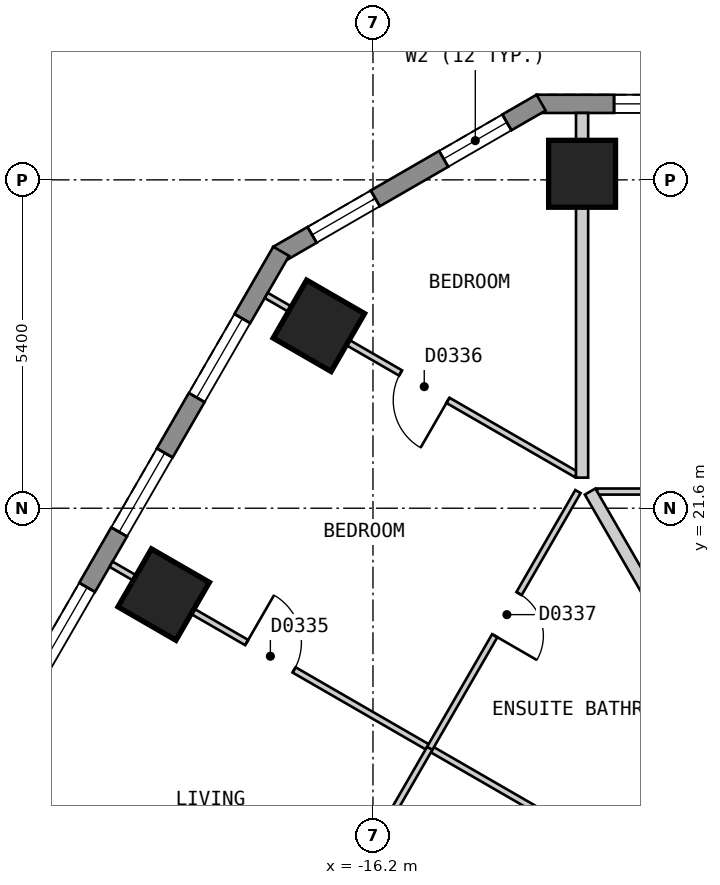
"""IFC4 building model, lengths in metres.
Left out: names, types, materials, properties, quantities, classifications, styles, units other than length and angle.
Written with IfcOpenShell. Run it as: python <this file> out.ifc"""

import sys

from ifc_helpers import new_model, si_unit, direction, frame, frame_2d, origin, origin_2d, place, context, subcontext, project, spatial, polyline, rectangle, outline, extrude, element, fill, save


model = new_model("IFC4")
c1 = context("Model", 3, precision=1e-05, world=origin(), true_north=direction((0.0, 1.0)))
c2 = subcontext(c1, "Body", "Model", "MODEL_VIEW")
j1 = project(units=[si_unit("LENGTHUNIT", "METRE"), si_unit("PLANEANGLEUNIT", "RADIAN")], contexts=[c1])
p1 = place(None, origin())
s1 = spatial("IfcSite", under=j1, at=p1, CompositionType="ELEMENT")
p2 = place(p1, origin())
s2 = spatial("IfcBuilding", under=s1, at=p2, CompositionType="ELEMENT")
p3 = place(p2, frame((0.0, 0.0, 59.4)))
s3 = spatial("IfcBuildingStorey", under=s2, at=p3, CompositionType="ELEMENT", Elevation=59.4)
for number, where, z_axis, x_axis in (
    (1, (-12.761, 27.1, 0.0), (0.0, 0.0, 1.0), (-1.0, 0.0, 0.0)),
    (2, (-17.09, 24.6, 0.0), (0.0, 0.0, 1.0), (-0.5, -0.866, 0.0)),
    (3, (-19.642, 20.18, 0.0), (0.0, 0.0, 1.0), (-0.5, -0.866, 0.0)),
):
    element("IfcColumn", number, at=place(p3, frame(where, z_axis=z_axis, x_axis=x_axis)), inside=s3, PredefinedType="COLUMN", context=c2, shape_type="SweptSolid", body=[
        extrude(rectangle(XDim=1.1, YDim=1.1, at=origin_2d()), origin(), (0.0, 0.0, 1.0), 3.0),
    ])
p4 = place(p3, frame((13.51, 28.25, 0.0), z_axis=(0.0, 0.0, 1.0), x_axis=(-1.0, 0.0, 0.0)))
e4 = element("IfcWall", 4, at=p4, inside=s3, PredefinedType="SOLIDWALL", context=c2, shape_type="SweptSolid", body=[
    extrude(outline(polyline([(0.0, -0.15), (27.02, -0.15), (26.94, 0.15), (0.08, 0.15), (0.0, -0.15)])), origin(), (0.0, 0.0, 1.0), 2.6),
])
p5 = place(p4, frame((1.277, 0.0, 0.15)))
e5 = element("IfcOpeningElement", 5, at=p5, cuts=e4, PredefinedType="OPENING", context=c2, shape_type="SweptSolid", body=[
    extrude(rectangle(XDim=1.5, YDim=2.1, at=frame_2d((0.75, 1.05))), frame((0.0, 0.16, 0.0), z_axis=(0.0, -1.0, 0.0), x_axis=(1.0, 0.0, 0.0)), (0.0, 0.0, 1.0), 0.32),
])
p6 = place(p4, frame((3.829, 0.0, 0.15)))
e6 = element("IfcOpeningElement", 6, at=p6, cuts=e4, PredefinedType="OPENING", context=c2, shape_type="SweptSolid", body=[
    extrude(rectangle(XDim=1.5, YDim=2.1, at=frame_2d((0.75, 1.05))), frame((0.0, 0.16, 0.0), z_axis=(0.0, -1.0, 0.0), x_axis=(1.0, 0.0, 0.0)), (0.0, 0.0, 1.0), 0.32),
])
p7 = place(p4, frame((6.381, 0.0, 0.15)))
e7 = element("IfcOpeningElement", 7, at=p7, cuts=e4, PredefinedType="OPENING", context=c2, shape_type="SweptSolid", body=[
    extrude(rectangle(XDim=1.5, YDim=2.1, at=frame_2d((0.75, 1.05))), frame((0.0, 0.16, 0.0), z_axis=(0.0, -1.0, 0.0), x_axis=(1.0, 0.0, 0.0)), (0.0, 0.0, 1.0), 0.32),
])
p8 = place(p4, frame((8.933, 0.0, 0.15)))
e8 = element("IfcOpeningElement", 8, at=p8, cuts=e4, PredefinedType="OPENING", context=c2, shape_type="SweptSolid", body=[
    extrude(rectangle(XDim=1.5, YDim=2.1, at=frame_2d((0.75, 1.05))), frame((0.0, 0.16, 0.0), z_axis=(0.0, -1.0, 0.0), x_axis=(1.0, 0.0, 0.0)), (0.0, 0.0, 1.0), 0.32),
])
p9 = place(p4, frame((11.485, 0.0, 0.15)))
e9 = element("IfcOpeningElement", 9, at=p9, cuts=e4, PredefinedType="OPENING", context=c2, shape_type="SweptSolid", body=[
    extrude(rectangle(XDim=1.5, YDim=2.1, at=frame_2d((0.75, 1.05))), frame((0.0, 0.16, 0.0), z_axis=(0.0, -1.0, 0.0), x_axis=(1.0, 0.0, 0.0)), (0.0, 0.0, 1.0), 0.32),
])
p10 = place(p4, frame((14.037, 0.0, 0.15)))
e10 = element("IfcOpeningElement", 10, at=p10, cuts=e4, PredefinedType="OPENING", context=c2, shape_type="SweptSolid", body=[
    extrude(rectangle(XDim=1.5, YDim=2.1, at=frame_2d((0.75, 1.05))), frame((0.0, 0.16, 0.0), z_axis=(0.0, -1.0, 0.0), x_axis=(1.0, 0.0, 0.0)), (0.0, 0.0, 1.0), 0.32),
])
p11 = place(p4, frame((16.589, 0.0, 0.15)))
e11 = element("IfcOpeningElement", 11, at=p11, cuts=e4, PredefinedType="OPENING", context=c2, shape_type="SweptSolid", body=[
    extrude(rectangle(XDim=1.5, YDim=2.1, at=frame_2d((0.75, 1.05))), frame((0.0, 0.16, 0.0), z_axis=(0.0, -1.0, 0.0), x_axis=(1.0, 0.0, 0.0)), (0.0, 0.0, 1.0), 0.32),
])
p12 = place(p4, frame((19.141, 0.0, 0.15)))
e12 = element("IfcOpeningElement", 12, at=p12, cuts=e4, PredefinedType="OPENING", context=c2, shape_type="SweptSolid", body=[
    extrude(rectangle(XDim=1.5, YDim=2.1, at=frame_2d((0.75, 1.05))), frame((0.0, 0.16, 0.0), z_axis=(0.0, -1.0, 0.0), x_axis=(1.0, 0.0, 0.0)), (0.0, 0.0, 1.0), 0.32),
])
p13 = place(p4, frame((21.693, 0.0, 0.15)))
e13 = element("IfcOpeningElement", 13, at=p13, cuts=e4, PredefinedType="OPENING", context=c2, shape_type="SweptSolid", body=[
    extrude(rectangle(XDim=1.5, YDim=2.1, at=frame_2d((0.75, 1.05))), frame((0.0, 0.16, 0.0), z_axis=(0.0, -1.0, 0.0), x_axis=(1.0, 0.0, 0.0)), (0.0, 0.0, 1.0), 0.32),
])
p14 = place(p4, frame((24.245, 0.0, 0.15)))
e14 = element("IfcOpeningElement", 14, at=p14, cuts=e4, PredefinedType="OPENING", context=c2, shape_type="SweptSolid", body=[
    extrude(rectangle(XDim=1.5, YDim=2.1, at=frame_2d((0.75, 1.05))), frame((0.0, 0.16, 0.0), z_axis=(0.0, -1.0, 0.0), x_axis=(1.0, 0.0, 0.0)), (0.0, 0.0, 1.0), 0.32),
])
p15 = place(p3, frame((-13.435, 28.27, 0.0), z_axis=(0.0, 0.0, 1.0), x_axis=(-0.866010750942, -0.50002537861, 0.0)))
e15 = element("IfcWall", 15, at=p15, inside=s3, PredefinedType="SOLIDWALL", context=c2, shape_type="SweptSolid", body=[
    extrude(outline(polyline([(0.0, -0.15), (5.0, -0.15), (4.919, 0.15), (0.08, 0.15), (0.0, -0.15)])), origin(), (0.0, 0.0, 1.0), 2.6),
])
p16 = place(p15, frame((0.65, 0.0, 0.15)))
e16 = element("IfcOpeningElement", 16, at=p16, cuts=e15, PredefinedType="OPENING", context=c2, shape_type="SweptSolid", body=[
    extrude(rectangle(XDim=1.2, YDim=2.1, at=frame_2d((0.6, 1.05))), frame((0.0, 0.16, 0.0), z_axis=(0.0, -1.0, 0.0), x_axis=(1.0, 0.0, 0.0)), (0.0, 0.0, 1.0), 0.32),
])
p17 = place(p15, frame((3.149, 0.0, 0.15)))
e17 = element("IfcOpeningElement", 17, at=p17, cuts=e15, PredefinedType="OPENING", context=c2, shape_type="SweptSolid", body=[
    extrude(rectangle(XDim=1.2, YDim=2.1, at=frame_2d((0.6, 1.05))), frame((0.0, 0.16, 0.0), z_axis=(0.0, -1.0, 0.0), x_axis=(1.0, 0.0, 0.0)), (0.0, 0.0, 1.0), 0.32),
])
p18 = place(p3, frame((-17.71, 25.825, 0.0), z_axis=(0.0, 0.0, 1.0), x_axis=(-0.500001938803, -0.866024284413, 0.0)))
e18 = element("IfcWall", 18, at=p18, inside=s3, PredefinedType="SOLIDWALL", context=c2, shape_type="SweptSolid", body=[
    extrude(outline(polyline([(0.0, -0.15), (27.02, -0.15), (26.94, 0.15), (0.08, 0.15), (0.0, -0.15)])), origin(), (0.0, 0.0, 1.0), 2.6),
])
p19 = place(p18, frame((1.277, 0.0, 0.15)))
e19 = element("IfcOpeningElement", 19, at=p19, cuts=e18, PredefinedType="OPENING", context=c2, shape_type="SweptSolid", body=[
    extrude(rectangle(XDim=1.5, YDim=2.1, at=frame_2d((0.75, 1.05))), frame((0.0, 0.16, 0.0), z_axis=(0.0, -1.0, 0.0), x_axis=(1.0, 0.0, 0.0)), (0.0, 0.0, 1.0), 0.32),
])
p20 = place(p18, frame((3.829, 0.0, 0.15)))
e20 = element("IfcOpeningElement", 20, at=p20, cuts=e18, PredefinedType="OPENING", context=c2, shape_type="SweptSolid", body=[
    extrude(rectangle(XDim=1.5, YDim=2.1, at=frame_2d((0.75, 1.05))), frame((0.0, 0.16, 0.0), z_axis=(0.0, -1.0, 0.0), x_axis=(1.0, 0.0, 0.0)), (0.0, 0.0, 1.0), 0.32),
])
p21 = place(p18, frame((6.382, 0.0, 0.15)))
e21 = element("IfcOpeningElement", 21, at=p21, cuts=e18, PredefinedType="OPENING", context=c2, shape_type="SweptSolid", body=[
    extrude(rectangle(XDim=1.5, YDim=2.1, at=frame_2d((0.75, 1.05))), frame((0.0, 0.16, 0.0), z_axis=(0.0, -1.0, 0.0), x_axis=(1.0, 0.0, 0.0)), (0.0, 0.0, 1.0), 0.32),
])
p22 = place(p18, frame((8.933, 0.0, 0.15)))
e22 = element("IfcOpeningElement", 22, at=p22, cuts=e18, PredefinedType="OPENING", context=c2, shape_type="SweptSolid", body=[
    extrude(rectangle(XDim=1.5, YDim=2.1, at=frame_2d((0.75, 1.05))), frame((0.0, 0.16, 0.0), z_axis=(0.0, -1.0, 0.0), x_axis=(1.0, 0.0, 0.0)), (0.0, 0.0, 1.0), 0.32),
])
p23 = place(p18, frame((11.485, 0.0, 0.15)))
e23 = element("IfcOpeningElement", 23, at=p23, cuts=e18, PredefinedType="OPENING", context=c2, shape_type="SweptSolid", body=[
    extrude(rectangle(XDim=1.5, YDim=2.1, at=frame_2d((0.75, 1.05))), frame((0.0, 0.16, 0.0), z_axis=(0.0, -1.0, 0.0), x_axis=(1.0, 0.0, 0.0)), (0.0, 0.0, 1.0), 0.32),
])
p24 = place(p18, frame((14.037, 0.0, 0.15)))
e24 = element("IfcOpeningElement", 24, at=p24, cuts=e18, PredefinedType="OPENING", context=c2, shape_type="SweptSolid", body=[
    extrude(rectangle(XDim=1.5, YDim=2.1, at=frame_2d((0.75, 1.05))), frame((0.0, 0.16, 0.0), z_axis=(0.0, -1.0, 0.0), x_axis=(1.0, 0.0, 0.0)), (0.0, 0.0, 1.0), 0.32),
])
p25 = place(p18, frame((16.589, 0.0, 0.15)))
e25 = element("IfcOpeningElement", 25, at=p25, cuts=e18, PredefinedType="OPENING", context=c2, shape_type="SweptSolid", body=[
    extrude(rectangle(XDim=1.5, YDim=2.1, at=frame_2d((0.75, 1.05))), frame((0.0, 0.16, 0.0), z_axis=(0.0, -1.0, 0.0), x_axis=(1.0, 0.0, 0.0)), (0.0, 0.0, 1.0), 0.32),
])
p26 = place(p18, frame((19.141, 0.0, 0.15)))
e26 = element("IfcOpeningElement", 26, at=p26, cuts=e18, PredefinedType="OPENING", context=c2, shape_type="SweptSolid", body=[
    extrude(rectangle(XDim=1.5, YDim=2.1, at=frame_2d((0.75, 1.05))), frame((0.0, 0.16, 0.0), z_axis=(0.0, -1.0, 0.0), x_axis=(1.0, 0.0, 0.0)), (0.0, 0.0, 1.0), 0.32),
])
p27 = place(p18, frame((21.693, 0.0, 0.15)))
e27 = element("IfcOpeningElement", 27, at=p27, cuts=e18, PredefinedType="OPENING", context=c2, shape_type="SweptSolid", body=[
    extrude(rectangle(XDim=1.5, YDim=2.1, at=frame_2d((0.75, 1.05))), frame((0.0, 0.16, 0.0), z_axis=(0.0, -1.0, 0.0), x_axis=(1.0, 0.0, 0.0)), (0.0, 0.0, 1.0), 0.32),
])
p28 = place(p18, frame((24.244, 0.0, 0.15)))
e28 = element("IfcOpeningElement", 28, at=p28, cuts=e18, PredefinedType="OPENING", context=c2, shape_type="SweptSolid", body=[
    extrude(rectangle(XDim=1.5, YDim=2.1, at=frame_2d((0.75, 1.05))), frame((0.0, 0.16, 0.0), z_axis=(0.0, -1.0, 0.0), x_axis=(1.0, 0.0, 0.0)), (0.0, 0.0, 1.0), 0.32),
])
p29 = place(p3, frame((-20.727, 0.099, 0.0), z_axis=(0.0, 0.0, 1.0), x_axis=(0.499993204491, 0.866029327138, 0.0)))
e29 = element("IfcWall", 29, at=p29, inside=s3, PredefinedType="PARTITIONING", context=c2, shape_type="SweptSolid", body=[
    extrude(rectangle(XDim=20.554, YDim=0.2, at=frame_2d((10.277, 0.0))), origin(), (0.0, 0.0, 1.0), 2.6),
])
p30 = place(p29, frame((14.88, 0.0, 0.0)))
e30 = element("IfcOpeningElement", 30, at=p30, cuts=e29, PredefinedType="OPENING", context=c2, shape_type="SweptSolid", body=[
    extrude(rectangle(XDim=1.0, YDim=2.1, at=frame_2d((0.5, 1.05))), frame((0.0, 0.11, 0.0), z_axis=(0.0, -1.0, 0.0), x_axis=(1.0, 0.0, 0.0)), (0.0, 0.0, 1.0), 0.22),
])
p31 = place(p29, frame((4.673, 0.0, 0.0)))
e31 = element("IfcOpeningElement", 31, at=p31, cuts=e29, PredefinedType="OPENING", context=c2, shape_type="SweptSolid", body=[
    extrude(rectangle(XDim=1.0, YDim=2.1, at=frame_2d((0.5, 1.05))), frame((0.0, 0.11, 0.0), z_axis=(0.0, -1.0, 0.0), x_axis=(1.0, 0.0, 0.0)), (0.0, 0.0, 1.0), 0.22),
])
p32 = place(p29, frame((0.838, 0.0, 0.0)))
e32 = element("IfcOpeningElement", 32, at=p32, cuts=e29, PredefinedType="OPENING", context=c2, shape_type="SweptSolid", body=[
    extrude(rectangle(XDim=0.8, YDim=2.1, at=frame_2d((0.4, 1.05))), frame((0.0, 0.11, 0.0), z_axis=(0.0, -1.0, 0.0), x_axis=(1.0, 0.0, 0.0)), (0.0, 0.0, 1.0), 0.22),
])
p33 = place(p3, frame((-20.508, 20.679, 0.0), z_axis=(0.0, 0.0, 1.0), x_axis=(0.866047370643, -0.499961950354, 0.0)))
e33 = element("IfcWall", 33, at=p33, inside=s3, PredefinedType="PARTITIONING", context=c2, shape_type="SweptSolid", body=[
    extrude(rectangle(XDim=10.001, YDim=0.1, at=frame_2d((5.0, 0.0))), origin(), (0.0, 0.0, 1.0), 2.6),
])
p34 = place(p33, frame((2.576, 0.0, 0.0)))
e34 = element("IfcOpeningElement", 34, at=p34, cuts=e33, PredefinedType="OPENING", context=c2, shape_type="SweptSolid", body=[
    extrude(rectangle(XDim=0.9, YDim=2.1, at=frame_2d((0.45, 1.05))), frame((0.0, 0.06, 0.0), z_axis=(0.0, -1.0, 0.0), x_axis=(1.0, 0.0, 0.0)), (0.0, 0.0, 1.0), 0.12),
])
p35 = place(p3, frame((-17.955, 25.099, 0.0), z_axis=(0.0, 0.0, 1.0), x_axis=(0.866036353684, -0.499981033738, 0.0)))
e35 = element("IfcWall", 35, at=p35, inside=s3, PredefinedType="PARTITIONING", context=c2, shape_type="SweptSolid", body=[
    extrude(rectangle(XDim=5.885, YDim=0.1, at=frame_2d((2.942, 0.0))), origin(), (0.0, 0.0, 1.0), 2.6),
])
p36 = place(p35, frame((2.55, 0.0, 0.0)))
e36 = element("IfcOpeningElement", 36, at=p36, cuts=e35, PredefinedType="OPENING", context=c2, shape_type="SweptSolid", body=[
    extrude(rectangle(XDim=0.9, YDim=2.1, at=frame_2d((0.45, 1.05))), frame((0.0, 0.06, 0.0), z_axis=(0.0, -1.0, 0.0), x_axis=(1.0, 0.0, 0.0)), (0.0, 0.0, 1.0), 0.12),
])
p37 = place(p3, frame((-12.513, 21.874, 0.0), z_axis=(0.0, 0.0, 1.0), x_axis=(1.0, 0.0, 0.0)))
e37 = element("IfcWall", 37, at=p37, inside=s3, PredefinedType="PARTITIONING", context=c2, shape_type="SweptSolid", body=[
    extrude(rectangle(XDim=4.806, YDim=0.1, at=frame_2d((2.403, 0.0))), origin(), (0.0, 0.0, 1.0), 2.6),
])
p38 = place(p37, frame((1.97, 0.0, 0.0)))
e38 = element("IfcOpeningElement", 38, at=p38, cuts=e37, PredefinedType="OPENING", context=c2, shape_type="SweptSolid", body=[
    extrude(rectangle(XDim=0.8, YDim=2.1, at=frame_2d((0.4, 1.05))), frame((0.0, 0.06, 0.0), z_axis=(0.0, -1.0, 0.0), x_axis=(1.0, 0.0, 0.0)), (0.0, 0.0, 1.0), 0.12),
])
p39 = place(p3, frame((-17.768, 13.319, 0.0), z_axis=(0.0, 0.0, 1.0), x_axis=(0.499958946799, 0.866049104564, 0.0)))
e39 = element("IfcWall", 39, at=p39, inside=s3, PredefinedType="PARTITIONING", context=c2, shape_type="SweptSolid", body=[
    extrude(rectangle(XDim=5.004, YDim=0.1, at=frame_2d((2.502, 0.0))), origin(), (0.0, 0.0, 1.0), 2.6),
])
p40 = place(p39, frame((2.002, 0.0, 0.0)))
e40 = element("IfcOpeningElement", 40, at=p40, cuts=e39, PredefinedType="OPENING", context=c2, shape_type="SweptSolid", body=[
    extrude(rectangle(XDim=0.9, YDim=2.1, at=frame_2d((0.45, 1.05))), frame((0.0, 0.06, 0.0), z_axis=(0.0, -1.0, 0.0), x_axis=(1.0, 0.0, 0.0)), (0.0, 0.0, 1.0), 0.12),
])
p41 = place(p3, frame((-12.629, 21.874, 0.0), z_axis=(0.0, 0.0, 1.0), x_axis=(0.500024801635, -0.86601108408, 0.0)))
e41 = element("IfcWall", 41, at=p41, inside=s3, PredefinedType="PARTITIONING", context=c2, shape_type="SweptSolid", body=[
    extrude(rectangle(XDim=4.473, YDim=0.2, at=frame_2d((2.237, 0.0))), origin(), (0.0, 0.0, 1.0), 2.6),
])
p42 = place(p3, frame((-12.761, 22.103, 0.0), z_axis=(0.0, 0.0, 1.0), x_axis=(0.0, 1.0, 0.0)))
e42 = element("IfcWall", 42, at=p42, inside=s3, PredefinedType="PARTITIONING", context=c2, shape_type="SweptSolid", body=[
    extrude(rectangle(XDim=5.997, YDim=0.2, at=frame_2d((2.999, 0.0))), origin(), (0.0, 0.0, 1.0), 2.6),
])
p43 = place(p3, frame((-15.266, 17.653, 0.0), z_axis=(0.0, 0.0, 1.0), x_axis=(0.500007182864, 0.866021256716, 0.0)))
e43 = element("IfcWall", 43, at=p43, inside=s3, PredefinedType="PARTITIONING", context=c2, shape_type="SweptSolid", body=[
    extrude(rectangle(XDim=4.874, YDim=0.1, at=frame_2d((2.437, 0.0))), origin(), (0.0, 0.0, 1.0), 2.6),
])
p44 = place(p43, frame((2.137, 0.0, 0.0)))
e44 = element("IfcOpeningElement", 44, at=p44, cuts=e43, PredefinedType="OPENING", context=c2, shape_type="SweptSolid", body=[
    extrude(rectangle(XDim=0.8, YDim=2.1, at=frame_2d((0.4, 1.05))), frame((0.0, 0.06, 0.0), z_axis=(0.0, -1.0, 0.0), x_axis=(1.0, 0.0, 0.0)), (0.0, 0.0, 1.0), 0.12),
])
p45 = place(p14, origin())
e45 = element("IfcWindow", 45, at=p45, inside=s3, PartitioningType="SINGLE_PANEL", PredefinedType="WINDOW", context=c2, shape_type="SweptSolid", body=[
    extrude(rectangle(XDim=1.5, YDim=2.1, at=frame_2d((0.75, 1.05))), frame((0.0, 0.03, 0.0), z_axis=(0.0, -1.0, 0.0), x_axis=(1.0, 0.0, 0.0)), (0.0, 0.0, 1.0), 0.06),
])
fill(e14, e45)
p46 = place(p16, origin())
e46 = element("IfcWindow", 46, at=p46, inside=s3, PartitioningType="SINGLE_PANEL", PredefinedType="WINDOW", context=c2, shape_type="SweptSolid", body=[
    extrude(rectangle(XDim=1.2, YDim=2.1, at=frame_2d((0.6, 1.05))), frame((0.0, 0.03, 0.0), z_axis=(0.0, -1.0, 0.0), x_axis=(1.0, 0.0, 0.0)), (0.0, 0.0, 1.0), 0.06),
])
fill(e16, e46)
p47 = place(p17, origin())
e47 = element("IfcWindow", 47, at=p47, inside=s3, PartitioningType="SINGLE_PANEL", PredefinedType="WINDOW", context=c2, shape_type="SweptSolid", body=[
    extrude(rectangle(XDim=1.2, YDim=2.1, at=frame_2d((0.6, 1.05))), frame((0.0, 0.03, 0.0), z_axis=(0.0, -1.0, 0.0), x_axis=(1.0, 0.0, 0.0)), (0.0, 0.0, 1.0), 0.06),
])
fill(e17, e47)
p48 = place(p19, origin())
e48 = element("IfcWindow", 48, at=p48, inside=s3, PartitioningType="SINGLE_PANEL", PredefinedType="WINDOW", context=c2, shape_type="SweptSolid", body=[
    extrude(rectangle(XDim=1.5, YDim=2.1, at=frame_2d((0.75, 1.05))), frame((0.0, 0.03, 0.0), z_axis=(0.0, -1.0, 0.0), x_axis=(1.0, 0.0, 0.0)), (0.0, 0.0, 1.0), 0.06),
])
fill(e19, e48)
p49 = place(p20, origin())
e49 = element("IfcWindow", 49, at=p49, inside=s3, PartitioningType="SINGLE_PANEL", PredefinedType="WINDOW", context=c2, shape_type="SweptSolid", body=[
    extrude(rectangle(XDim=1.5, YDim=2.1, at=frame_2d((0.75, 1.05))), frame((0.0, 0.03, 0.0), z_axis=(0.0, -1.0, 0.0), x_axis=(1.0, 0.0, 0.0)), (0.0, 0.0, 1.0), 0.06),
])
fill(e20, e49)
p50 = place(p21, origin())
e50 = element("IfcWindow", 50, at=p50, inside=s3, PartitioningType="SINGLE_PANEL", PredefinedType="WINDOW", context=c2, shape_type="SweptSolid", body=[
    extrude(rectangle(XDim=1.5, YDim=2.1, at=frame_2d((0.75, 1.05))), frame((0.0, 0.03, 0.0), z_axis=(0.0, -1.0, 0.0), x_axis=(1.0, 0.0, 0.0)), (0.0, 0.0, 1.0), 0.06),
])
fill(e21, e50)
p51 = place(p34, origin())
e51 = element("IfcDoor", 51, at=p51, inside=s3, OperationType="SINGLE_SWING_LEFT", PredefinedType="DOOR", context=c2, shape_type="SweptSolid", body=[
    extrude(rectangle(XDim=0.9, YDim=2.1, at=frame_2d((0.45, 1.05))), frame((0.0, 0.025, 0.0), z_axis=(0.0, -1.0, 0.0), x_axis=(1.0, 0.0, 0.0)), (0.0, 0.0, 1.0), 0.05),
])
fill(e34, e51)
p52 = place(p36, origin())
e52 = element("IfcDoor", 52, at=p52, inside=s3, OperationType="SINGLE_SWING_RIGHT", PredefinedType="DOOR", context=c2, shape_type="SweptSolid", body=[
    extrude(rectangle(XDim=0.9, YDim=2.1, at=frame_2d((0.45, 1.05))), frame((0.0, 0.025, 0.0), z_axis=(0.0, -1.0, 0.0), x_axis=(1.0, 0.0, 0.0)), (0.0, 0.0, 1.0), 0.05),
])
fill(e36, e52)
p53 = place(p44, origin())
e53 = element("IfcDoor", 53, at=p53, inside=s3, OperationType="SINGLE_SWING_LEFT", PredefinedType="DOOR", context=c2, shape_type="SweptSolid", body=[
    extrude(rectangle(XDim=0.8, YDim=2.1, at=frame_2d((0.4, 1.05))), frame((0.0, 0.025, 0.0), z_axis=(0.0, -1.0, 0.0), x_axis=(1.0, 0.0, 0.0)), (0.0, 0.0, 1.0), 0.05),
])
fill(e44, e53)
save(model, sys.argv[1])
